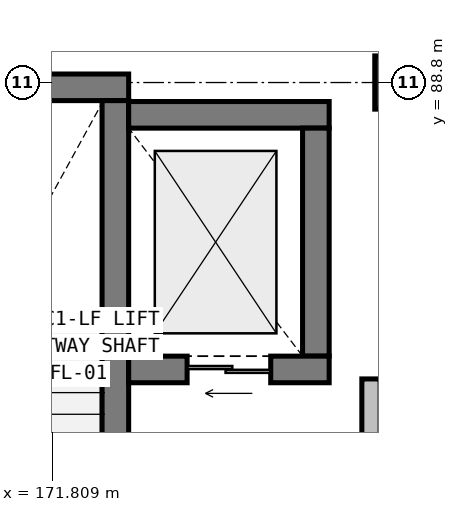
"""IFC4 building model, lengths in metres.
Left out: names, types, materials, properties, quantities, classifications, styles, units other than length and angle.
Written with IfcOpenShell. Run it as: python <this file> out.ifc"""

import sys

from ifc_helpers import new_model, si_unit, direction, frame, frame_2d, origin, origin_2d, place, context, subcontext, project, spatial, rectangle, extrude, element, fill, save


model = new_model("IFC4")
c1 = context("Model", 3, precision=1e-05, world=origin(), true_north=direction((0.0, 1.0)))
c2 = subcontext(c1, "Body", "Model", "MODEL_VIEW")
j1 = project(units=[si_unit("LENGTHUNIT", "METRE"), si_unit("PLANEANGLEUNIT", "RADIAN")], contexts=[c1])
p1 = place(None, origin())
s1 = spatial("IfcSite", under=j1, at=p1, CompositionType="ELEMENT")
p2 = place(p1, origin())
s2 = spatial("IfcBuilding", under=s1, at=p2, CompositionType="ELEMENT")
p3 = place(p2, frame((0.0, 0.0, 6.0)))
s3 = spatial("IfcBuildingStorey", under=s2, at=p3, CompositionType="ELEMENT", Elevation=6.0)
p4 = place(p3, frame((176.4, 88.8, 0.0), z_axis=(0.0, 0.0, 1.0), x_axis=(1.0, 0.0, 0.0)))
e1 = element("IfcColumn", 1, at=p4, inside=s3, PredefinedType="COLUMN", context=c2, shape_type="SweptSolid", body=[
    extrude(rectangle(XDim=0.7, YDim=0.7, at=origin_2d()), origin(), (0.0, 0.0, 1.0), 5.4),
])
p5 = place(p3, frame((168.188, 88.737, 0.0), z_axis=(0.0, 0.0, 1.0), x_axis=(1.0, 0.0, 0.0)))
e2 = element("IfcWall", 2, at=p5, inside=s3, PredefinedType="SHEAR", context=c2, shape_type="SweptSolid", body=[
    extrude(rectangle(XDim=4.624, YDim=0.35, at=frame_2d((2.312, 0.0))), origin(), (0.0, 0.0, 1.0), 5.08),
])
p6 = place(p3, frame((172.637, 88.562, 0.0), z_axis=(0.0, 0.0, 1.0), x_axis=(0.0, -1.0, 0.0)))
e3 = element("IfcWall", 3, at=p6, inside=s3, PredefinedType="SHEAR", context=c2, shape_type="SweptSolid", body=[
    extrude(rectangle(XDim=9.124, YDim=0.35, at=frame_2d((4.562, 0.0))), origin(), (0.0, 0.0, 1.0), 5.08),
])
p7 = place(p3, frame((172.812, 88.375, 0.0), z_axis=(0.0, 0.0, 1.0), x_axis=(1.0, 0.0, 0.0)))
e4 = element("IfcWall", 4, at=p7, inside=s3, PredefinedType="SHEAR", context=c2, shape_type="SweptSolid", body=[
    extrude(rectangle(XDim=2.638, YDim=0.35, at=frame_2d((1.319, 0.0))), origin(), (0.0, 0.0, 1.0), 5.08),
])
p8 = place(p3, frame((175.275, 88.2, 0.0), z_axis=(0.0, 0.0, 1.0), x_axis=(0.0, -1.0, 0.0)))
e5 = element("IfcWall", 5, at=p8, inside=s3, PredefinedType="SHEAR", context=c2, shape_type="SweptSolid", body=[
    extrude(rectangle(XDim=3.0, YDim=0.35, at=frame_2d((1.5, 0.0))), origin(), (0.0, 0.0, 1.0), 5.08),
])
p9 = place(p3, frame((175.45, 85.025, 0.0), z_axis=(0.0, 0.0, 1.0), x_axis=(-1.0, 0.0, 0.0)))
e6 = element("IfcWall", 6, at=p9, inside=s3, PredefinedType="SHEAR", context=c2, shape_type="SweptSolid", body=[
    extrude(rectangle(XDim=2.638, YDim=0.35, at=frame_2d((1.319, 0.0))), origin(), (0.0, 0.0, 1.0), 5.08),
])
p10 = place(p9, frame((0.769, 0.0, 0.0)))
e7 = element("IfcOpeningElement", 7, at=p10, cuts=e6, PredefinedType="OPENING", context=c2, shape_type="SweptSolid", body=[
    extrude(rectangle(XDim=1.1, YDim=2.2, at=frame_2d((0.55, 1.1))), frame((0.0, 0.185, 0.0), z_axis=(0.0, -1.0, 0.0), x_axis=(1.0, 0.0, 0.0)), (0.0, 0.0, 1.0), 0.37),
])
p11 = place(p3, frame((176.0, 84.9, 0.0), z_axis=(0.0, 0.0, 1.0), x_axis=(0.0, -1.0, 0.0)))
e8 = element("IfcWall", 8, at=p11, inside=s3, PredefinedType="PARTITIONING", context=c2, shape_type="SweptSolid", body=[
    extrude(rectangle(XDim=5.5, YDim=0.24, at=frame_2d((2.75, 0.0))), origin(), (0.0, 0.0, 1.0), 4.405),
])
p12 = place(p10, origin())
e9 = element("IfcDoor", 9, at=p12, inside=s3, OperationType="DOUBLE_DOOR_SLIDING", PredefinedType="DOOR", context=c2, shape_type="SweptSolid", body=[
    extrude(rectangle(XDim=1.1, YDim=2.2, at=frame_2d((0.55, 1.1))), frame((0.0, 0.025, 0.0), z_axis=(0.0, -1.0, 0.0), x_axis=(1.0, 0.0, 0.0)), (0.0, 0.0, 1.0), 0.05),
])
fill(e7, e9)
save(model, sys.argv[1])
